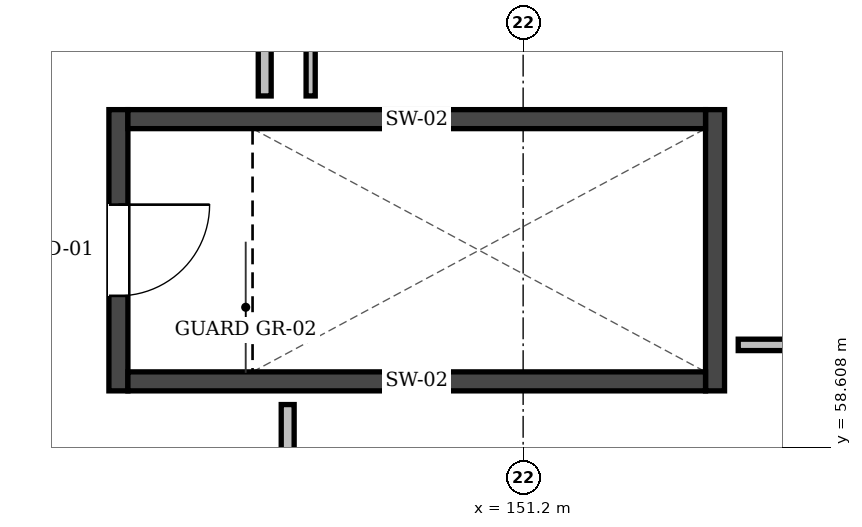
"""IFC4 building model, lengths in metres.
Left out: names, types, materials, properties, quantities, classifications, styles, units other than length and angle.
Written with IfcOpenShell. Run it as: python <this file> out.ifc"""

import sys

from ifc_helpers import new_model, si_unit, direction, frame, frame_2d, origin, place, context, subcontext, project, spatial, rectangle, extrude, element, fill, save


model = new_model("IFC4")
c1 = context("Model", 3, precision=1e-05, world=origin(), true_north=direction((0.0, 1.0)))
c2 = subcontext(c1, "Body", "Model", "MODEL_VIEW")
j1 = project(units=[si_unit("LENGTHUNIT", "METRE"), si_unit("PLANEANGLEUNIT", "RADIAN")], contexts=[c1])
p1 = place(None, origin())
s1 = spatial("IfcSite", under=j1, at=p1, CompositionType="ELEMENT")
p2 = place(p1, origin())
s2 = spatial("IfcBuilding", under=s1, at=p2, CompositionType="ELEMENT")
p3 = place(p2, frame((0.0, 0.0, 4.8)))
s3 = spatial("IfcBuildingStorey", under=s2, at=p3, CompositionType="ELEMENT", Elevation=4.8)
p4 = place(p3, frame((145.875, 59.35, 0.0), z_axis=(0.0, 0.0, 1.0), x_axis=(0.0, 1.0, 0.0)))
e1 = element("IfcWall", 1, at=p4, inside=s3, PredefinedType="SHEAR", context=c2, shape_type="SweptSolid", body=[
    extrude(rectangle(XDim=3.7, YDim=0.25, at=frame_2d((1.85, 0.0))), origin(), (0.0, 0.0, 1.0), 4.55),
])
p5 = place(p4, frame((1.25, 0.0, 0.0)))
e2 = element("IfcOpeningElement", 2, at=p5, cuts=e1, PredefinedType="OPENING", context=c2, shape_type="SweptSolid", body=[
    extrude(rectangle(XDim=1.2, YDim=2.15, at=frame_2d((0.6, 1.075))), frame((0.0, 0.137, 0.0), z_axis=(0.0, -1.0, 0.0), x_axis=(1.0, 0.0, 0.0)), (0.0, 0.0, 1.0), 0.274),
])
p6 = place(p3, frame((153.725, 59.35, 0.0), z_axis=(0.0, 0.0, 1.0), x_axis=(0.0, 1.0, 0.0)))
e3 = element("IfcWall", 3, at=p6, inside=s3, PredefinedType="SHEAR", context=c2, shape_type="SweptSolid", body=[
    extrude(rectangle(XDim=3.7, YDim=0.25, at=frame_2d((1.85, 0.0))), origin(), (0.0, 0.0, 1.0), 4.55),
])
for number, where, z_axis, x_axis in (
    (4, (146.0, 59.475, 0.0), (0.0, 0.0, 1.0), (1.0, 0.0, 0.0)),
    (5, (146.0, 62.925, 0.0), (0.0, 0.0, 1.0), (1.0, 0.0, 0.0)),
):
    element("IfcWall", number, at=place(p3, frame(where, z_axis=z_axis, x_axis=x_axis)), inside=s3, PredefinedType="SHEAR", context=c2, shape_type="SweptSolid", body=[
        extrude(rectangle(XDim=7.6, YDim=0.25, at=frame_2d((3.8, 0.0))), origin(), (0.0, 0.0, 1.0), 4.55),
    ])
p7 = place(p3, frame((147.8, 63.23, 0.0), z_axis=(0.0, 0.0, 1.0), x_axis=(0.0, 1.0, 0.0)))
e6 = element("IfcWall", 6, at=p7, inside=s3, PredefinedType="PARTITIONING", context=c2, shape_type="SweptSolid", body=[
    extrude(rectangle(XDim=15.07, YDim=0.17, at=frame_2d((7.535, 0.0))), origin(), (0.0, 0.0, 1.0), 4.46),
])
p8 = place(p7, frame((6.455, 0.0, 0.0)))
e7 = element("IfcOpeningElement", 7, at=p8, cuts=e6, PredefinedType="OPENING", context=c2, shape_type="SweptSolid", body=[
    extrude(rectangle(XDim=2.16, YDim=2.35, at=frame_2d((1.08, 1.175))), frame((0.0, 0.097, 0.0), z_axis=(0.0, -1.0, 0.0), x_axis=(1.0, 0.0, 0.0)), (0.0, 0.0, 1.0), 0.194),
])
p9 = place(p7, frame((12.82, 0.0, 1.05)))
e8 = element("IfcOpeningElement", 8, at=p9, cuts=e6, PredefinedType="OPENING", context=c2, shape_type="SweptSolid", body=[
    extrude(rectangle(XDim=1.8, YDim=1.05, at=frame_2d((0.9, 0.525))), frame((0.0, 0.097, 0.0), z_axis=(0.0, -1.0, 0.0), x_axis=(1.0, 0.0, 0.0)), (0.0, 0.0, 1.0), 0.194),
])
p10 = place(p3, frame((148.102, 39.824, 0.0), z_axis=(0.0, 0.0, 1.0), x_axis=(0.0, 1.0, 0.0)))
e9 = element("IfcWall", 9, at=p10, inside=s3, PredefinedType="PARTITIONING", context=c2, shape_type="SweptSolid", body=[
    extrude(rectangle(XDim=19.346, YDim=0.17, at=frame_2d((9.673, 0.0))), origin(), (0.0, 0.0, 1.0), 4.46),
])
p11 = place(p10, frame((8.933, 0.0, 0.0)))
e10 = element("IfcOpeningElement", 10, at=p11, cuts=e9, PredefinedType="OPENING", context=c2, shape_type="SweptSolid", body=[
    extrude(rectangle(XDim=1.48, YDim=2.26, at=frame_2d((0.74, 1.13))), frame((0.0, 0.097, 0.0), z_axis=(0.0, -1.0, 0.0), x_axis=(1.0, 0.0, 0.0)), (0.0, 0.0, 1.0), 0.194),
])
p12 = place(p10, frame((7.303, 0.0, 0.0)))
e11 = element("IfcOpeningElement", 11, at=p12, cuts=e9, PredefinedType="OPENING", context=c2, shape_type="SweptSolid", body=[
    extrude(rectangle(XDim=1.14, YDim=2.2, at=frame_2d((0.57, 1.1))), frame((0.0, 0.097, 0.0), z_axis=(0.0, -1.0, 0.0), x_axis=(1.0, 0.0, 0.0)), (0.0, 0.0, 1.0), 0.194),
])
p13 = place(p10, frame((10.863, 0.0, 0.0)))
e12 = element("IfcOpeningElement", 12, at=p13, cuts=e9, PredefinedType="OPENING", context=c2, shape_type="SweptSolid", body=[
    extrude(rectangle(XDim=1.22, YDim=2.22, at=frame_2d((0.61, 1.11))), frame((0.0, 0.097, 0.0), z_axis=(0.0, -1.0, 0.0), x_axis=(1.0, 0.0, 0.0)), (0.0, 0.0, 1.0), 0.194),
])
p14 = place(p10, frame((5.633, 0.0, 0.0)))
e13 = element("IfcOpeningElement", 13, at=p14, cuts=e9, PredefinedType="OPENING", context=c2, shape_type="SweptSolid", body=[
    extrude(rectangle(XDim=1.28, YDim=2.22, at=frame_2d((0.64, 1.11))), frame((0.0, 0.097, 0.0), z_axis=(0.0, -1.0, 0.0), x_axis=(1.0, 0.0, 0.0)), (0.0, 0.0, 1.0), 0.194),
])
p15 = place(p10, frame((12.603, 0.0, 0.0)))
e14 = element("IfcOpeningElement", 14, at=p15, cuts=e9, PredefinedType="OPENING", context=c2, shape_type="SweptSolid", body=[
    extrude(rectangle(XDim=1.34, YDim=2.24, at=frame_2d((0.67, 1.12))), frame((0.0, 0.097, 0.0), z_axis=(0.0, -1.0, 0.0), x_axis=(1.0, 0.0, 0.0)), (0.0, 0.0, 1.0), 0.194),
])
p16 = place(p10, frame((3.763, 0.0, 0.0)))
e15 = element("IfcOpeningElement", 15, at=p16, cuts=e9, PredefinedType="OPENING", context=c2, shape_type="SweptSolid", body=[
    extrude(rectangle(XDim=1.42, YDim=2.24, at=frame_2d((0.71, 1.12))), frame((0.0, 0.097, 0.0), z_axis=(0.0, -1.0, 0.0), x_axis=(1.0, 0.0, 0.0)), (0.0, 0.0, 1.0), 0.194),
])
p17 = place(p10, frame((14.333, 0.0, 0.0)))
e16 = element("IfcOpeningElement", 16, at=p17, cuts=e9, PredefinedType="OPENING", context=c2, shape_type="SweptSolid", body=[
    extrude(rectangle(XDim=1.48, YDim=2.26, at=frame_2d((0.74, 1.13))), frame((0.0, 0.097, 0.0), z_axis=(0.0, -1.0, 0.0), x_axis=(1.0, 0.0, 0.0)), (0.0, 0.0, 1.0), 0.194),
])
p18 = place(p10, frame((2.383, 0.0, 0.0)))
e17 = element("IfcOpeningElement", 17, at=p18, cuts=e9, PredefinedType="OPENING", context=c2, shape_type="SweptSolid", body=[
    extrude(rectangle(XDim=0.98, YDim=2.14, at=frame_2d((0.49, 1.07))), frame((0.0, 0.097, 0.0), z_axis=(0.0, -1.0, 0.0), x_axis=(1.0, 0.0, 0.0)), (0.0, 0.0, 1.0), 0.194),
])
p19 = place(p3, frame((148.404, 63.23, 0.0), z_axis=(0.0, 0.0, 1.0), x_axis=(0.0, 1.0, 0.0)))
e18 = element("IfcWall", 18, at=p19, inside=s3, PredefinedType="PARTITIONING", context=c2, shape_type="SweptSolid", body=[
    extrude(rectangle(XDim=16.53, YDim=0.12, at=frame_2d((8.265, 0.0))), origin(), (0.0, 0.0, 1.0), 4.46),
])
p20 = place(p19, frame((7.185, 0.0, 0.0)))
e19 = element("IfcOpeningElement", 19, at=p20, cuts=e18, PredefinedType="OPENING", context=c2, shape_type="SweptSolid", body=[
    extrude(rectangle(XDim=2.16, YDim=2.35, at=frame_2d((1.08, 1.175))), frame((0.0, 0.072, 0.0), z_axis=(0.0, -1.0, 0.0), x_axis=(1.0, 0.0, 0.0)), (0.0, 0.0, 1.0), 0.144),
])
p21 = place(p3, frame((154.03, 59.955, 0.0), z_axis=(0.0, 0.0, 1.0), x_axis=(1.0, 0.0, 0.0)))
e20 = element("IfcWall", 20, at=p21, inside=s3, PredefinedType="PARTITIONING", context=c2, shape_type="SweptSolid", body=[
    extrude(rectangle(XDim=11.408, YDim=0.15, at=frame_2d((5.704, 0.0))), origin(), (0.0, 0.0, 1.0), 4.46),
])
p22 = place(p5, frame((1.2, 0.0, 0.0), z_axis=(0.0, 0.0, 1.0), x_axis=(-1.0, 0.0, 0.0)))
e21 = element("IfcDoor", 21, at=p22, inside=s3, OperationType="SINGLE_SWING_LEFT", PredefinedType="DOOR", context=c2, shape_type="SweptSolid", body=[
    extrude(rectangle(XDim=1.2, YDim=2.15, at=frame_2d((0.6, 1.075))), frame((0.0, 0.025, 0.0), z_axis=(0.0, -1.0, 0.0), x_axis=(1.0, 0.0, 0.0)), (0.0, 0.0, 1.0), 0.05),
])
fill(e2, e21)
save(model, sys.argv[1])
